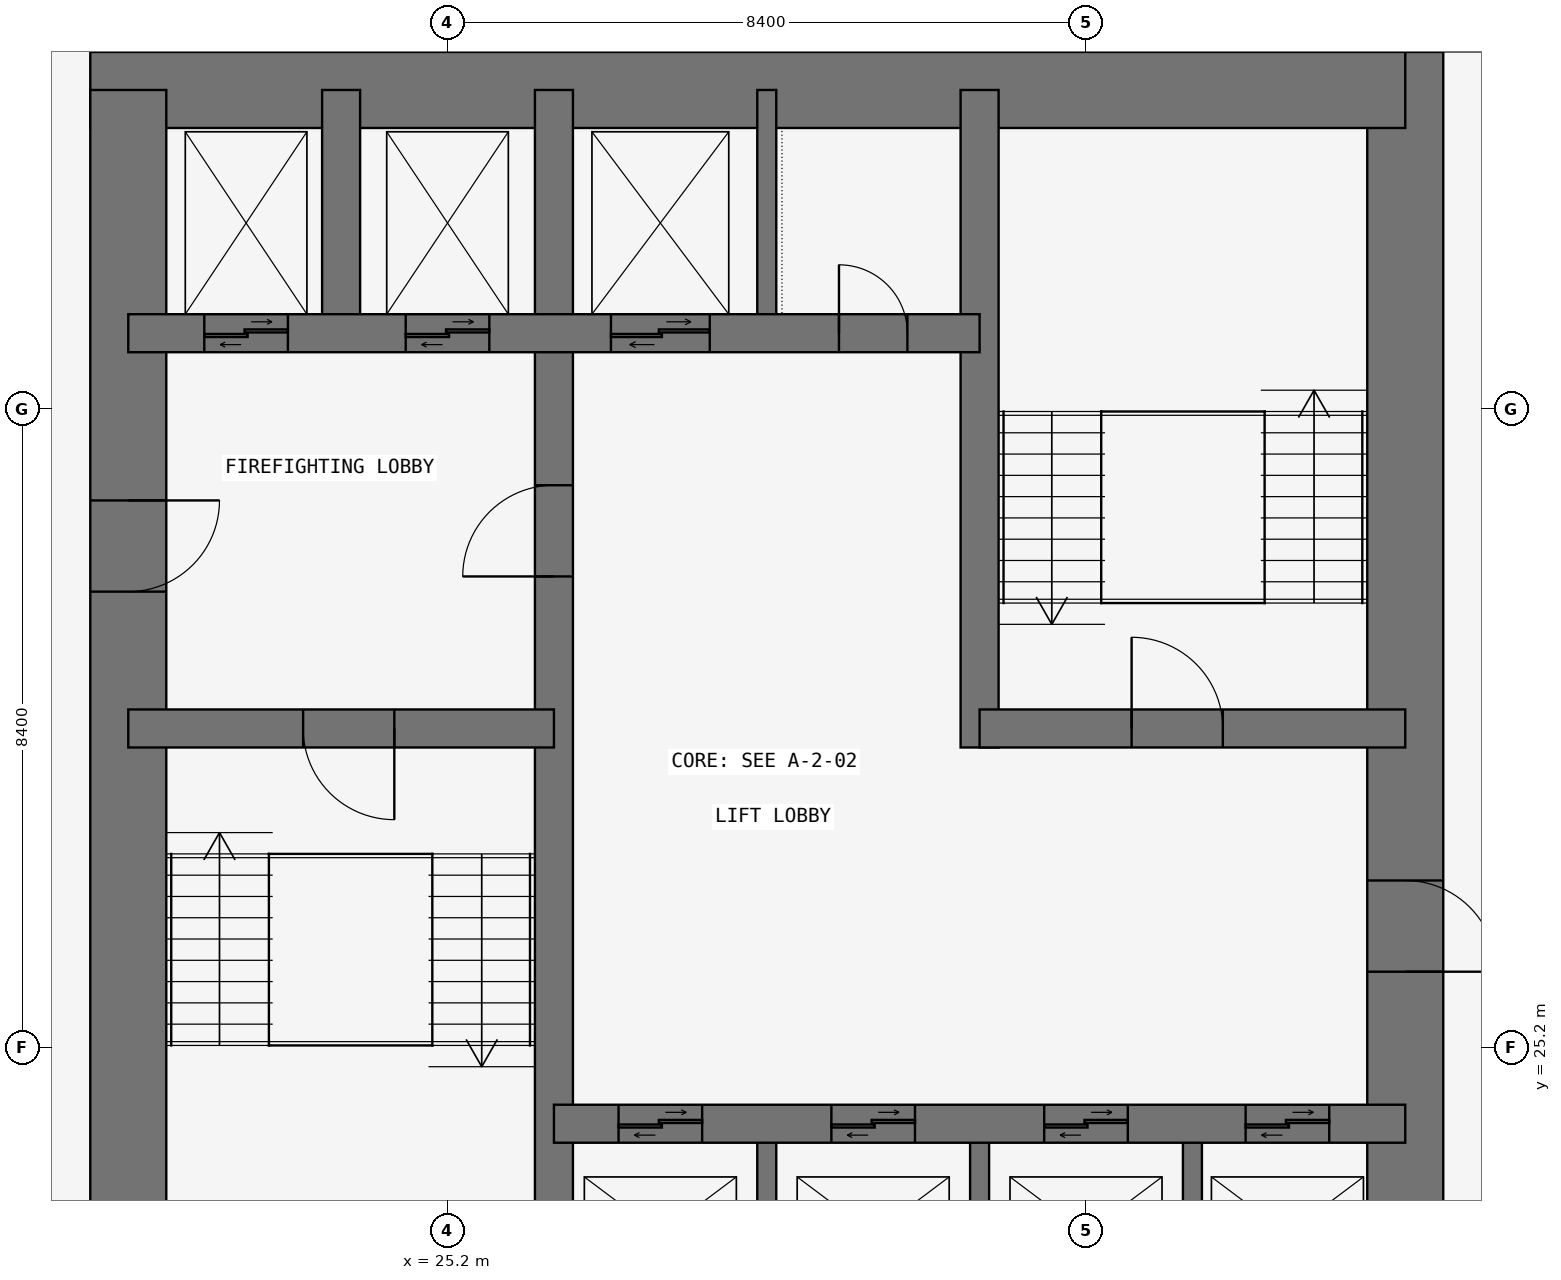
"""IFC4 building model, lengths in metres.
Left out: names, types, materials, properties, quantities, classifications, styles, units other than length and angle.
Written with IfcOpenShell. Run it as: python <this file> out.ifc"""

import sys

from ifc_helpers import new_model, si_unit, direction, frame, frame_2d, origin, place, context, subcontext, project, spatial, rectangle, extrude, element, fill, save


model = new_model("IFC4")
c1 = context("Model", 3, precision=1e-05, world=origin(), true_north=direction((0.0, 1.0)))
c2 = subcontext(c1, "Body", "Model", "MODEL_VIEW")
j1 = project(units=[si_unit("LENGTHUNIT", "METRE"), si_unit("PLANEANGLEUNIT", "RADIAN")], contexts=[c1])
p1 = place(None, origin())
s1 = spatial("IfcSite", under=j1, at=p1, CompositionType="ELEMENT")
p2 = place(p1, origin())
s2 = spatial("IfcBuilding", under=s1, at=p2, CompositionType="ELEMENT")
p3 = place(p2, frame((0.0, 0.0, -3.6)))
s3 = spatial("IfcBuildingStorey", under=s2, at=p3, CompositionType="ELEMENT", Elevation=-3.6)
p4 = place(p3, frame((37.8, 21.0, 0.0), z_axis=(0.0, 0.0, 1.0), x_axis=(0.0, 1.0, 0.0)))
e1 = element("IfcWall", 1, at=p4, inside=s3, PredefinedType="SHEAR", context=c2, shape_type="SweptSolid", body=[
    extrude(rectangle(XDim=17.3, YDim=1.0, at=frame_2d((8.65, 0.0))), origin(), (0.0, 0.0, 1.0), 3.6),
])
p5 = place(p4, frame((5.2, 0.0, 0.0)))
e2 = element("IfcOpeningElement", 2, at=p5, cuts=e1, PredefinedType="OPENING", context=c2, shape_type="SweptSolid", body=[
    extrude(rectangle(XDim=1.2, YDim=2.1, at=frame_2d((0.6, 1.05))), frame((0.0, 0.51, 0.0), z_axis=(0.0, -1.0, 0.0), x_axis=(1.0, 0.0, 0.0)), (0.0, 0.0, 1.0), 1.02),
])
p6 = place(p3, frame((37.8, 37.8, 0.0), z_axis=(0.0, 0.0, 1.0), x_axis=(-1.0, 0.0, 0.0)))
e3 = element("IfcWall", 3, at=p6, inside=s3, PredefinedType="SHEAR", context=c2, shape_type="SweptSolid", body=[
    extrude(rectangle(XDim=17.3, YDim=1.0, at=frame_2d((8.65, 0.0))), origin(), (0.0, 0.0, 1.0), 3.6),
])
p7 = place(p3, frame((21.0, 37.8, 0.0), z_axis=(0.0, 0.0, 1.0), x_axis=(0.0, -1.0, 0.0)))
e4 = element("IfcWall", 4, at=p7, inside=s3, PredefinedType="SHEAR", context=c2, shape_type="SweptSolid", body=[
    extrude(rectangle(XDim=17.3, YDim=1.0, at=frame_2d((8.65, 0.0))), origin(), (0.0, 0.0, 1.0), 3.6),
])
p8 = place(p7, frame((5.4, 0.0, 0.0)))
e5 = element("IfcOpeningElement", 5, at=p8, cuts=e4, PredefinedType="OPENING", context=c2, shape_type="SweptSolid", body=[
    extrude(rectangle(XDim=1.2, YDim=2.1, at=frame_2d((0.6, 1.05))), frame((0.0, 0.51, 0.0), z_axis=(0.0, -1.0, 0.0), x_axis=(1.0, 0.0, 0.0)), (0.0, 0.0, 1.0), 1.02),
])
p9 = place(p3, frame((26.6, 21.0, 0.0), z_axis=(0.0, 0.0, 1.0), x_axis=(0.0, 1.0, 0.0)))
e6 = element("IfcWall", 6, at=p9, inside=s3, PredefinedType="SHEAR", context=c2, shape_type="SweptSolid", body=[
    extrude(rectangle(XDim=16.8, YDim=0.5, at=frame_2d((8.4, 0.0))), origin(), (0.0, 0.0, 1.0), 3.6),
])
p10 = place(p9, frame((10.4, 0.0, 0.0)))
e7 = element("IfcOpeningElement", 7, at=p10, cuts=e6, PredefinedType="OPENING", context=c2, shape_type="SweptSolid", body=[
    extrude(rectangle(XDim=1.2, YDim=2.1, at=frame_2d((0.6, 1.05))), frame((0.0, 0.26, 0.0), z_axis=(0.0, -1.0, 0.0), x_axis=(1.0, 0.0, 0.0)), (0.0, 0.0, 1.0), 0.52),
])
p11 = place(p3, frame((21.0, 29.4, 0.0), z_axis=(0.0, 0.0, 1.0), x_axis=(1.0, 0.0, 0.0)))
e8 = element("IfcWall", 8, at=p11, inside=s3, PredefinedType="SHEAR", context=c2, shape_type="SweptSolid", body=[
    extrude(rectangle(XDim=5.6, YDim=0.5, at=frame_2d((2.8, 0.0))), origin(), (0.0, 0.0, 1.0), 3.6),
])
p12 = place(p11, frame((2.3, 0.0, 0.0)))
e9 = element("IfcOpeningElement", 9, at=p12, cuts=e8, PredefinedType="OPENING", context=c2, shape_type="SweptSolid", body=[
    extrude(rectangle(XDim=1.2, YDim=2.1, at=frame_2d((0.6, 1.05))), frame((0.0, 0.26, 0.0), z_axis=(0.0, -1.0, 0.0), x_axis=(1.0, 0.0, 0.0)), (0.0, 0.0, 1.0), 0.52),
])
p13 = place(p3, frame((21.0, 34.6, 0.0), z_axis=(0.0, 0.0, 1.0), x_axis=(1.0, 0.0, 0.0)))
e10 = element("IfcWall", 10, at=p13, inside=s3, PredefinedType="SHEAR", context=c2, shape_type="SweptSolid", body=[
    extrude(rectangle(XDim=11.2, YDim=0.5, at=frame_2d((5.6, 0.0))), origin(), (0.0, 0.0, 1.0), 3.6),
])
p14 = place(p13, frame((9.35, 0.0, 0.0)))
e11 = element("IfcOpeningElement", 11, at=p14, cuts=e10, PredefinedType="OPENING", context=c2, shape_type="SweptSolid", body=[
    extrude(rectangle(XDim=0.9, YDim=2.1, at=frame_2d((0.45, 1.05))), frame((0.0, 0.26, 0.0), z_axis=(0.0, -1.0, 0.0), x_axis=(1.0, 0.0, 0.0)), (0.0, 0.0, 1.0), 0.52),
])
p15 = place(p13, frame((1.0, 0.0, 0.0)))
e12 = element("IfcOpeningElement", 12, at=p15, cuts=e10, PredefinedType="OPENING", context=c2, shape_type="SweptSolid", body=[
    extrude(rectangle(XDim=1.1, YDim=2.1, at=frame_2d((0.55, 1.05))), frame((0.0, 0.26, 0.0), z_axis=(0.0, -1.0, 0.0), x_axis=(1.0, 0.0, 0.0)), (0.0, 0.0, 1.0), 0.52),
])
p16 = place(p13, frame((3.65, 0.0, 0.0)))
e13 = element("IfcOpeningElement", 13, at=p16, cuts=e10, PredefinedType="OPENING", context=c2, shape_type="SweptSolid", body=[
    extrude(rectangle(XDim=1.1, YDim=2.1, at=frame_2d((0.55, 1.05))), frame((0.0, 0.26, 0.0), z_axis=(0.0, -1.0, 0.0), x_axis=(1.0, 0.0, 0.0)), (0.0, 0.0, 1.0), 0.52),
])
p17 = place(p13, frame((6.35, 0.0, 0.0)))
e14 = element("IfcOpeningElement", 14, at=p17, cuts=e10, PredefinedType="OPENING", context=c2, shape_type="SweptSolid", body=[
    extrude(rectangle(XDim=1.3, YDim=2.1, at=frame_2d((0.65, 1.05))), frame((0.0, 0.26, 0.0), z_axis=(0.0, -1.0, 0.0), x_axis=(1.0, 0.0, 0.0)), (0.0, 0.0, 1.0), 0.52),
])
p18 = place(p3, frame((23.8, 34.6, 0.0), z_axis=(0.0, 0.0, 1.0), x_axis=(0.0, 1.0, 0.0)))
e15 = element("IfcWall", 15, at=p18, inside=s3, PredefinedType="SHEAR", context=c2, shape_type="SweptSolid", body=[
    extrude(rectangle(XDim=3.2, YDim=0.5, at=frame_2d((1.6, 0.0))), origin(), (0.0, 0.0, 1.0), 3.6),
])
p19 = place(p3, frame((26.6, 24.2, 0.0), z_axis=(0.0, 0.0, 1.0), x_axis=(1.0, 0.0, 0.0)))
e16 = element("IfcWall", 16, at=p19, inside=s3, PredefinedType="SHEAR", context=c2, shape_type="SweptSolid", body=[
    extrude(rectangle(XDim=11.2, YDim=0.5, at=frame_2d((5.6, 0.0))), origin(), (0.0, 0.0, 1.0), 3.6),
])
p20 = place(p19, frame((0.85, 0.0, 0.0)))
e17 = element("IfcOpeningElement", 17, at=p20, cuts=e16, PredefinedType="OPENING", context=c2, shape_type="SweptSolid", body=[
    extrude(rectangle(XDim=1.1, YDim=2.1, at=frame_2d((0.55, 1.05))), frame((0.0, 0.26, 0.0), z_axis=(0.0, -1.0, 0.0), x_axis=(1.0, 0.0, 0.0)), (0.0, 0.0, 1.0), 0.52),
])
p21 = place(p19, frame((3.65, 0.0, 0.0)))
e18 = element("IfcOpeningElement", 18, at=p21, cuts=e16, PredefinedType="OPENING", context=c2, shape_type="SweptSolid", body=[
    extrude(rectangle(XDim=1.1, YDim=2.1, at=frame_2d((0.55, 1.05))), frame((0.0, 0.26, 0.0), z_axis=(0.0, -1.0, 0.0), x_axis=(1.0, 0.0, 0.0)), (0.0, 0.0, 1.0), 0.52),
])
p22 = place(p19, frame((6.45, 0.0, 0.0)))
e19 = element("IfcOpeningElement", 19, at=p22, cuts=e16, PredefinedType="OPENING", context=c2, shape_type="SweptSolid", body=[
    extrude(rectangle(XDim=1.1, YDim=2.1, at=frame_2d((0.55, 1.05))), frame((0.0, 0.26, 0.0), z_axis=(0.0, -1.0, 0.0), x_axis=(1.0, 0.0, 0.0)), (0.0, 0.0, 1.0), 0.52),
])
p23 = place(p19, frame((9.1, 0.0, 0.0)))
e20 = element("IfcOpeningElement", 20, at=p23, cuts=e16, PredefinedType="OPENING", context=c2, shape_type="SweptSolid", body=[
    extrude(rectangle(XDim=1.1, YDim=2.1, at=frame_2d((0.55, 1.05))), frame((0.0, 0.26, 0.0), z_axis=(0.0, -1.0, 0.0), x_axis=(1.0, 0.0, 0.0)), (0.0, 0.0, 1.0), 0.52),
])
p24 = place(p3, frame((32.2, 29.15, 0.0), z_axis=(0.0, 0.0, 1.0), x_axis=(0.0, 1.0, 0.0)))
e21 = element("IfcWall", 21, at=p24, inside=s3, PredefinedType="SHEAR", context=c2, shape_type="SweptSolid", body=[
    extrude(rectangle(XDim=8.65, YDim=0.5, at=frame_2d((4.325, 0.0))), origin(), (0.0, 0.0, 1.0), 3.6),
])
p25 = place(p3, frame((32.2, 29.4, 0.0), z_axis=(0.0, 0.0, 1.0), x_axis=(1.0, 0.0, 0.0)))
e22 = element("IfcWall", 22, at=p25, inside=s3, PredefinedType="SHEAR", context=c2, shape_type="SweptSolid", body=[
    extrude(rectangle(XDim=5.6, YDim=0.5, at=frame_2d((2.8, 0.0))), origin(), (0.0, 0.0, 1.0), 3.6),
])
p26 = place(p25, frame((2.0, 0.0, 0.0)))
e23 = element("IfcOpeningElement", 23, at=p26, cuts=e22, PredefinedType="OPENING", context=c2, shape_type="SweptSolid", body=[
    extrude(rectangle(XDim=1.2, YDim=2.1, at=frame_2d((0.6, 1.05))), frame((0.0, 0.26, 0.0), z_axis=(0.0, -1.0, 0.0), x_axis=(1.0, 0.0, 0.0)), (0.0, 0.0, 1.0), 0.52),
])
for number, where, z_axis, x_axis in (
    (24, (29.4, 21.0, 0.0), (0.0, 0.0, 1.0), (0.0, 1.0, 0.0)),
    (25, (32.2, 21.0, 0.0), (0.0, 0.0, 1.0), (0.0, 1.0, 0.0)),
    (26, (35.0, 21.0, 0.0), (0.0, 0.0, 1.0), (0.0, 1.0, 0.0)),
    (27, (29.4, 34.6, 0.0), (0.0, 0.0, 1.0), (0.0, 1.0, 0.0)),
):
    element("IfcWall", number, at=place(p3, frame(where, z_axis=z_axis, x_axis=x_axis)), inside=s3, PredefinedType="SHEAR", context=c2, shape_type="SweptSolid", body=[
        extrude(rectangle(XDim=3.2, YDim=0.25, at=frame_2d((1.6, 0.0))), origin(), (0.0, 0.0, 1.0), 3.6),
    ])
p27 = place(p8, origin())
e28 = element("IfcDoor", 28, at=p27, inside=s3, OperationType="SINGLE_SWING_LEFT", PredefinedType="DOOR", context=c2, shape_type="SweptSolid", body=[
    extrude(rectangle(XDim=1.2, YDim=2.1, at=frame_2d((0.6, 1.05))), frame((0.0, 0.025, 0.0), z_axis=(0.0, -1.0, 0.0), x_axis=(1.0, 0.0, 0.0)), (0.0, 0.0, 1.0), 0.05),
])
fill(e5, e28)
p28 = place(p12, frame((1.2, 0.0, 0.0), z_axis=(0.0, 0.0, 1.0), x_axis=(-1.0, 0.0, 0.0)))
e29 = element("IfcDoor", 29, at=p28, inside=s3, OperationType="SINGLE_SWING_LEFT", PredefinedType="DOOR", context=c2, shape_type="SweptSolid", body=[
    extrude(rectangle(XDim=1.2, YDim=2.1, at=frame_2d((0.6, 1.05))), frame((0.0, 0.025, 0.0), z_axis=(0.0, -1.0, 0.0), x_axis=(1.0, 0.0, 0.0)), (0.0, 0.0, 1.0), 0.05),
])
fill(e9, e29)
p29 = place(p10, origin())
e30 = element("IfcDoor", 30, at=p29, inside=s3, OperationType="SINGLE_SWING_LEFT", PredefinedType="DOOR", context=c2, shape_type="SweptSolid", body=[
    extrude(rectangle(XDim=1.2, YDim=2.1, at=frame_2d((0.6, 1.05))), frame((0.0, 0.025, 0.0), z_axis=(0.0, -1.0, 0.0), x_axis=(1.0, 0.0, 0.0)), (0.0, 0.0, 1.0), 0.05),
])
fill(e7, e30)
p30 = place(p5, frame((1.2, 0.0, 0.0), z_axis=(0.0, 0.0, 1.0), x_axis=(-1.0, 0.0, 0.0)))
e31 = element("IfcDoor", 31, at=p30, inside=s3, OperationType="SINGLE_SWING_RIGHT", PredefinedType="DOOR", context=c2, shape_type="SweptSolid", body=[
    extrude(rectangle(XDim=1.2, YDim=2.1, at=frame_2d((0.6, 1.05))), frame((0.0, 0.025, 0.0), z_axis=(0.0, -1.0, 0.0), x_axis=(1.0, 0.0, 0.0)), (0.0, 0.0, 1.0), 0.05),
])
fill(e2, e31)
p31 = place(p26, origin())
e32 = element("IfcDoor", 32, at=p31, inside=s3, OperationType="SINGLE_SWING_LEFT", PredefinedType="DOOR", context=c2, shape_type="SweptSolid", body=[
    extrude(rectangle(XDim=1.2, YDim=2.1, at=frame_2d((0.6, 1.05))), frame((0.0, 0.025, 0.0), z_axis=(0.0, -1.0, 0.0), x_axis=(1.0, 0.0, 0.0)), (0.0, 0.0, 1.0), 0.05),
])
fill(e23, e32)
p32 = place(p14, origin())
e33 = element("IfcDoor", 33, at=p32, inside=s3, OperationType="SINGLE_SWING_LEFT", PredefinedType="DOOR", context=c2, shape_type="SweptSolid", body=[
    extrude(rectangle(XDim=0.9, YDim=2.1, at=frame_2d((0.45, 1.05))), frame((0.0, 0.025, 0.0), z_axis=(0.0, -1.0, 0.0), x_axis=(1.0, 0.0, 0.0)), (0.0, 0.0, 1.0), 0.05),
])
fill(e11, e33)
p33 = place(p20, origin())
e34 = element("IfcDoor", 34, at=p33, inside=s3, OperationType="DOUBLE_DOOR_SLIDING", PredefinedType="DOOR", context=c2, shape_type="SweptSolid", body=[
    extrude(rectangle(XDim=1.1, YDim=2.1, at=frame_2d((0.55, 1.05))), frame((0.0, 0.025, 0.0), z_axis=(0.0, -1.0, 0.0), x_axis=(1.0, 0.0, 0.0)), (0.0, 0.0, 1.0), 0.05),
])
fill(e17, e34)
p34 = place(p21, origin())
e35 = element("IfcDoor", 35, at=p34, inside=s3, OperationType="DOUBLE_DOOR_SLIDING", PredefinedType="DOOR", context=c2, shape_type="SweptSolid", body=[
    extrude(rectangle(XDim=1.1, YDim=2.1, at=frame_2d((0.55, 1.05))), frame((0.0, 0.025, 0.0), z_axis=(0.0, -1.0, 0.0), x_axis=(1.0, 0.0, 0.0)), (0.0, 0.0, 1.0), 0.05),
])
fill(e18, e35)
p35 = place(p22, origin())
e36 = element("IfcDoor", 36, at=p35, inside=s3, OperationType="DOUBLE_DOOR_SLIDING", PredefinedType="DOOR", context=c2, shape_type="SweptSolid", body=[
    extrude(rectangle(XDim=1.1, YDim=2.1, at=frame_2d((0.55, 1.05))), frame((0.0, 0.025, 0.0), z_axis=(0.0, -1.0, 0.0), x_axis=(1.0, 0.0, 0.0)), (0.0, 0.0, 1.0), 0.05),
])
fill(e19, e36)
p36 = place(p23, origin())
e37 = element("IfcDoor", 37, at=p36, inside=s3, OperationType="DOUBLE_DOOR_SLIDING", PredefinedType="DOOR", context=c2, shape_type="SweptSolid", body=[
    extrude(rectangle(XDim=1.1, YDim=2.1, at=frame_2d((0.55, 1.05))), frame((0.0, 0.025, 0.0), z_axis=(0.0, -1.0, 0.0), x_axis=(1.0, 0.0, 0.0)), (0.0, 0.0, 1.0), 0.05),
])
fill(e20, e37)
p37 = place(p15, origin())
e38 = element("IfcDoor", 38, at=p37, inside=s3, OperationType="DOUBLE_DOOR_SLIDING", PredefinedType="DOOR", context=c2, shape_type="SweptSolid", body=[
    extrude(rectangle(XDim=1.1, YDim=2.1, at=frame_2d((0.55, 1.05))), frame((0.0, 0.025, 0.0), z_axis=(0.0, -1.0, 0.0), x_axis=(1.0, 0.0, 0.0)), (0.0, 0.0, 1.0), 0.05),
])
fill(e12, e38)
p38 = place(p16, origin())
e39 = element("IfcDoor", 39, at=p38, inside=s3, OperationType="DOUBLE_DOOR_SLIDING", PredefinedType="DOOR", context=c2, shape_type="SweptSolid", body=[
    extrude(rectangle(XDim=1.1, YDim=2.1, at=frame_2d((0.55, 1.05))), frame((0.0, 0.025, 0.0), z_axis=(0.0, -1.0, 0.0), x_axis=(1.0, 0.0, 0.0)), (0.0, 0.0, 1.0), 0.05),
])
fill(e13, e39)
p39 = place(p17, origin())
e40 = element("IfcDoor", 40, at=p39, inside=s3, OperationType="DOUBLE_DOOR_SLIDING", PredefinedType="DOOR", context=c2, shape_type="SweptSolid", body=[
    extrude(rectangle(XDim=1.3, YDim=2.1, at=frame_2d((0.65, 1.05))), frame((0.0, 0.025, 0.0), z_axis=(0.0, -1.0, 0.0), x_axis=(1.0, 0.0, 0.0)), (0.0, 0.0, 1.0), 0.05),
])
fill(e14, e40)
save(model, sys.argv[1])
